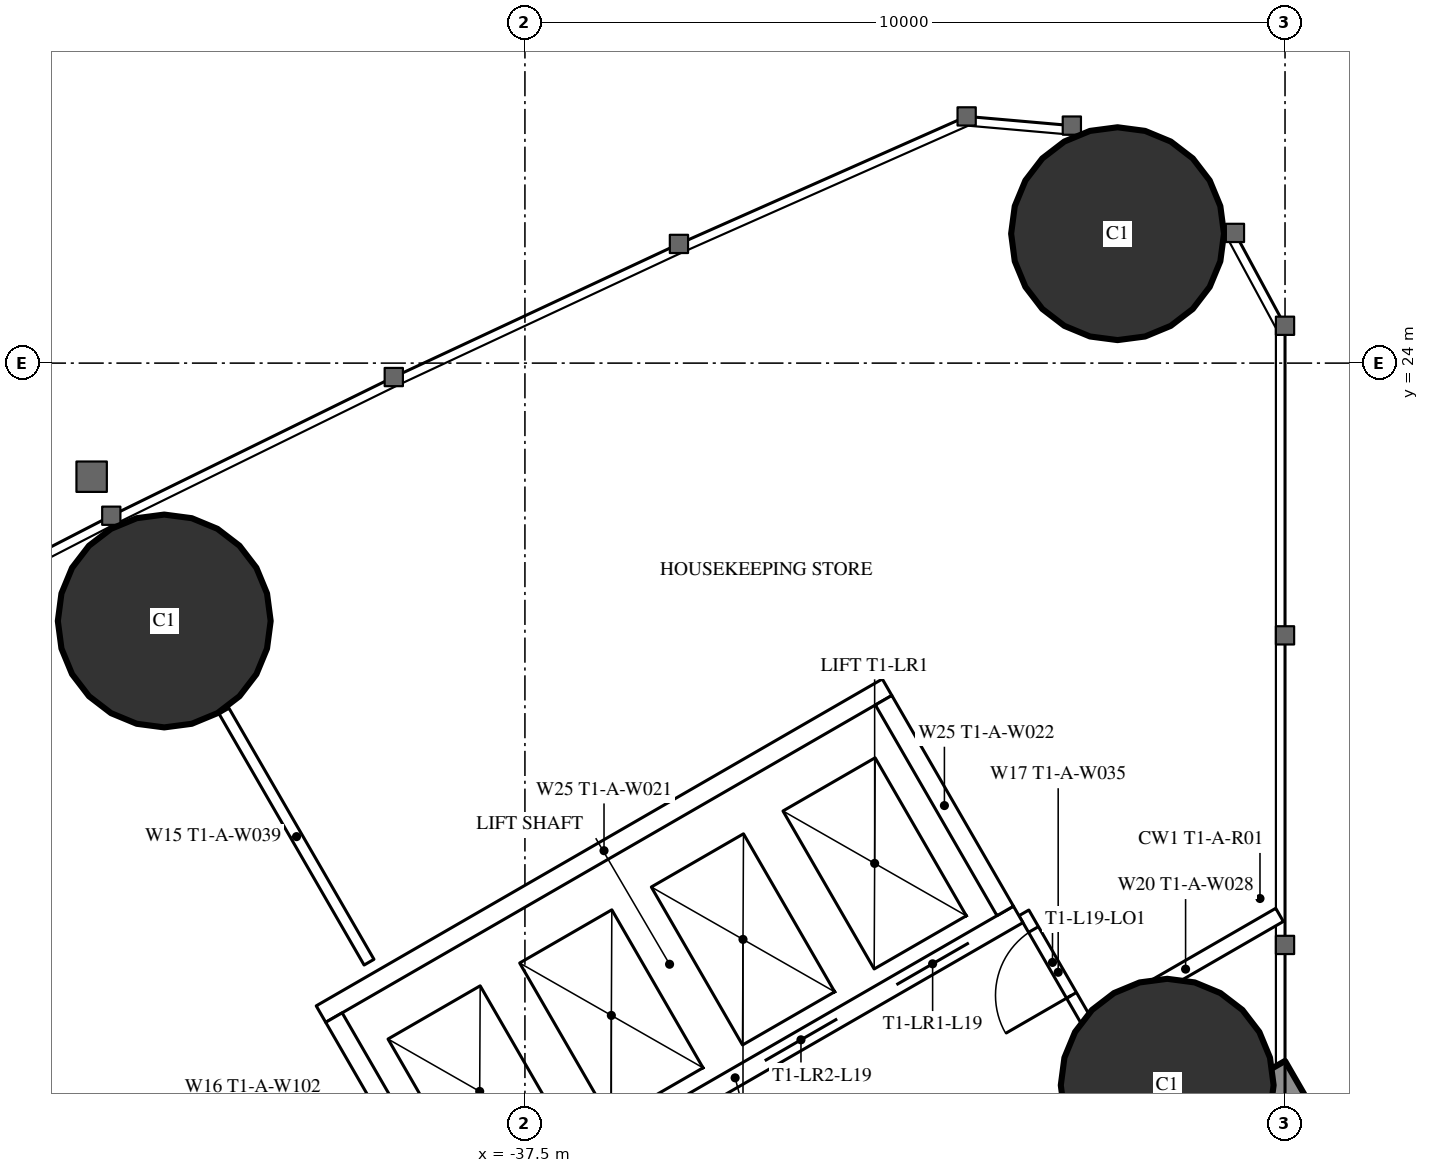
"""IFC4 building model, lengths in metres.
Left out: names, types, materials, properties, quantities, classifications, styles, units other than length and angle.
Written with IfcOpenShell. Run it as: python <this file> out.ifc"""

import sys

from ifc_helpers import new_model, si_unit, direction, frame, frame_2d, origin, origin_2d, place, context, subcontext, project, spatial, rectangle, hollow_circle, extrude, element, fill, save


model = new_model("IFC4")
c1 = context("Model", 3, precision=1e-05, world=origin(), true_north=direction((0.0, 1.0)))
c2 = subcontext(c1, "Body", "Model", "MODEL_VIEW")
j1 = project(units=[si_unit("LENGTHUNIT", "METRE"), si_unit("PLANEANGLEUNIT", "RADIAN")], contexts=[c1])
p1 = place(None, origin())
s1 = spatial("IfcSite", under=j1, at=p1, CompositionType="ELEMENT")
p2 = place(p1, origin())
s2 = spatial("IfcBuilding", under=s1, at=p2, CompositionType="ELEMENT")
p3 = place(p2, frame((0.0, 0.0, 74.0)))
s3 = spatial("IfcBuildingStorey", under=s2, at=p3, CompositionType="ELEMENT", Elevation=74.0)
for number, where, z_axis, x_axis in (
    (1, (-29.703, 25.703, 0.0), (0.0, 0.0, 1.0), (1.0, 0.0, 0.0)),
    (2, (-29.05, 14.5, 0.0), (0.0, 0.0, 1.0), (1.0, 0.0, 0.0)),
    (3, (-42.245, 20.607, 0.0), (0.0, 0.0, 1.0), (1.0, 0.0, 0.0)),
):
    element("IfcColumn", number, at=place(p3, frame(where, z_axis=z_axis, x_axis=x_axis)), inside=s3, PredefinedType="COLUMN", context=c2, shape_type="SweptSolid", body=[
        extrude(hollow_circle(Radius=1.4, WallThickness=0.12, at=origin_2d()), origin(), (0.0, 0.0, 1.0), 3.5),
    ])
p4 = place(p3, frame((-27.2, 14.3, 0.0), z_axis=(0.0, 0.0, 1.0), x_axis=(-0.866026593062, -0.499997940104, 0.0)))
e4 = element("IfcWall", 4, at=p4, inside=s3, PredefinedType="SHEAR", context=c2, shape_type="SweptSolid", body=[
    extrude(rectangle(XDim=28.946, YDim=1.2, at=frame_2d((14.473, 0.0))), origin(), (0.0, 0.0, 1.0), 3.5),
])
p5 = place(p4, frame((4.6, 0.0, 0.0)))
e5 = element("IfcOpeningElement", 5, at=p5, cuts=e4, PredefinedType="OPENING", context=c2, shape_type="SweptSolid", body=[
    extrude(rectangle(XDim=1.0, YDim=2.2, at=frame_2d((0.5, 1.1))), frame((0.0, 0.61, 0.0), z_axis=(0.0, -1.0, 0.0), x_axis=(1.0, 0.0, 0.0)), (0.0, 0.0, 1.0), 1.22),
])
p6 = place(p4, frame((13.395, 0.0, 0.0)))
e6 = element("IfcOpeningElement", 6, at=p6, cuts=e4, PredefinedType="OPENING", context=c2, shape_type="SweptSolid", body=[
    extrude(rectangle(XDim=1.8, YDim=2.2, at=frame_2d((0.9, 1.1))), frame((0.0, 0.61, 0.0), z_axis=(0.0, -1.0, 0.0), x_axis=(1.0, 0.0, 0.0)), (0.0, 0.0, 1.0), 1.22),
])
p7 = place(p3, frame((-39.551, 16.119, 0.0), z_axis=(0.0, 0.0, 1.0), x_axis=(-0.500014214979, 0.866017196607, 0.0)))
e7 = element("IfcWall", 7, at=p7, inside=s3, PredefinedType="PARTITIONING", context=c2, shape_type="SweptSolid", body=[
    extrude(rectangle(XDim=3.815, YDim=0.15, at=frame_2d((1.907, 0.0))), origin(), (0.0, 0.0, 1.0), 3.25),
])
p8 = place(p3, frame((-27.572, 16.741, 0.0), z_axis=(0.0, 0.0, 1.0), x_axis=(-0.866034618596, -0.499984039138, 0.0)))
e8 = element("IfcWall", 8, at=p8, inside=s3, PredefinedType="PARTITIONING", context=c2, shape_type="SweptSolid", body=[
    extrude(rectangle(XDim=2.854, YDim=0.2, at=frame_2d((1.427, 0.0))), origin(), (0.0, 0.0, 1.0), 3.25),
])
p9 = place(p3, frame((-30.033, 15.205, 0.0), z_axis=(0.0, 0.0, 1.0), x_axis=(-0.499980071345, 0.866036909293, 0.0)))
e9 = element("IfcWall", 9, at=p9, inside=s3, PredefinedType="PARTITIONING", context=c2, shape_type="SweptSolid", body=[
    extrude(rectangle(XDim=1.805, YDim=0.15, at=frame_2d((0.902, 0.0))), origin(), (0.0, 0.0, 1.0), 3.25),
])
p10 = place(p9, frame((0.552, 0.0, 0.0)))
e10 = element("IfcOpeningElement", 10, at=p10, cuts=e9, PredefinedType="OPENING", context=c2, shape_type="SweptSolid", body=[
    extrude(rectangle(XDim=1.0, YDim=2.2, at=frame_2d((0.5, 1.1))), frame((0.0, 0.085, 0.0), z_axis=(0.0, -1.0, 0.0), x_axis=(1.0, 0.0, 0.0)), (0.0, 0.0, 1.0), 0.17),
])
p11 = place(p3, frame((-31.01, 16.747, 0.0), z_axis=(0.0, 0.0, 1.0), x_axis=(-0.866028165386, -0.499995216735, 0.0)))
e11 = element("IfcWall", 11, at=p11, inside=s3, PredefinedType="PARTITIONING", context=c2, shape_type="SweptSolid", body=[
    extrude(rectangle(XDim=8.6, YDim=0.25, at=frame_2d((4.3, 0.0))), origin(), (0.0, 0.0, 1.0), 3.25),
])
p12 = place(p11, frame((0.75, 0.0, 0.0)))
e12 = element("IfcOpeningElement", 12, at=p12, cuts=e11, PredefinedType="OPENING", context=c2, shape_type="SweptSolid", body=[
    extrude(rectangle(XDim=1.1, YDim=2.2, at=frame_2d((0.55, 1.1))), frame((0.0, 0.135, 0.0), z_axis=(0.0, -1.0, 0.0), x_axis=(1.0, 0.0, 0.0)), (0.0, 0.0, 1.0), 0.27),
])
p13 = place(p11, frame((2.75, 0.0, 0.0)))
e13 = element("IfcOpeningElement", 13, at=p13, cuts=e11, PredefinedType="OPENING", context=c2, shape_type="SweptSolid", body=[
    extrude(rectangle(XDim=1.1, YDim=2.2, at=frame_2d((0.55, 1.1))), frame((0.0, 0.135, 0.0), z_axis=(0.0, -1.0, 0.0), x_axis=(1.0, 0.0, 0.0)), (0.0, 0.0, 1.0), 0.27),
])
p14 = place(p11, frame((4.75, 0.0, 0.0)))
e14 = element("IfcOpeningElement", 14, at=p14, cuts=e11, PredefinedType="OPENING", context=c2, shape_type="SweptSolid", body=[
    extrude(rectangle(XDim=1.1, YDim=2.2, at=frame_2d((0.55, 1.1))), frame((0.0, 0.135, 0.0), z_axis=(0.0, -1.0, 0.0), x_axis=(1.0, 0.0, 0.0)), (0.0, 0.0, 1.0), 0.27),
])
p15 = place(p11, frame((6.75, 0.0, 0.0)))
e15 = element("IfcOpeningElement", 15, at=p15, cuts=e11, PredefinedType="OPENING", context=c2, shape_type="SweptSolid", body=[
    extrude(rectangle(XDim=1.1, YDim=2.2, at=frame_2d((0.55, 1.1))), frame((0.0, 0.135, 0.0), z_axis=(0.0, -1.0, 0.0), x_axis=(1.0, 0.0, 0.0)), (0.0, 0.0, 1.0), 0.27),
])
p16 = place(p3, frame((-32.736, 19.736, 0.0), z_axis=(0.0, 0.0, 1.0), x_axis=(-0.866028165386, -0.499995216735, 0.0)))
e16 = element("IfcWall", 16, at=p16, inside=s3, PredefinedType="PARTITIONING", context=c2, shape_type="SweptSolid", body=[
    extrude(rectangle(XDim=8.6, YDim=0.25, at=frame_2d((4.3, 0.0))), origin(), (0.0, 0.0, 1.0), 3.25),
])
p17 = place(p3, frame((-31.181, 16.793, 0.0), z_axis=(0.0, 0.0, 1.0), x_axis=(-0.499929347863, 0.866066190972, 0.0)))
e17 = element("IfcWall", 17, at=p17, inside=s3, PredefinedType="PARTITIONING", context=c2, shape_type="SweptSolid", body=[
    extrude(rectangle(XDim=3.201, YDim=0.25, at=frame_2d((1.6, 0.0))), origin(), (0.0, 0.0, 1.0), 3.25),
])
p18 = place(p3, frame((-38.413, 12.618, 0.0), z_axis=(0.0, 0.0, 1.0), x_axis=(-0.499872130319, 0.866099216793, 0.0)))
e18 = element("IfcWall", 18, at=p18, inside=s3, PredefinedType="PARTITIONING", context=c2, shape_type="SweptSolid", body=[
    extrude(rectangle(XDim=3.2, YDim=0.25, at=frame_2d((1.6, 0.0))), origin(), (0.0, 0.0, 1.0), 3.25),
])
p19 = place(p10, origin())
e19 = element("IfcDoor", 19, at=p19, inside=s3, OperationType="SINGLE_SWING_LEFT", PredefinedType="DOOR", context=c2, shape_type="SweptSolid", body=[
    extrude(rectangle(XDim=1.0, YDim=2.2, at=frame_2d((0.5, 1.1))), frame((0.0, 0.025, 0.0), z_axis=(0.0, -1.0, 0.0), x_axis=(1.0, 0.0, 0.0)), (0.0, 0.0, 1.0), 0.05),
])
fill(e10, e19)
p20 = place(p12, origin())
e20 = element("IfcDoor", 20, at=p20, inside=s3, OperationType="DOUBLE_DOOR_SLIDING", PredefinedType="USERDEFINED", context=c2, shape_type="SweptSolid", body=[
    extrude(rectangle(XDim=1.1, YDim=2.2, at=frame_2d((0.55, 1.1))), frame((0.0, 0.025, 0.0), z_axis=(0.0, -1.0, 0.0), x_axis=(1.0, 0.0, 0.0)), (0.0, 0.0, 1.0), 0.05),
])
fill(e12, e20)
p21 = place(p13, origin())
e21 = element("IfcDoor", 21, at=p21, inside=s3, OperationType="DOUBLE_DOOR_SLIDING", PredefinedType="USERDEFINED", context=c2, shape_type="SweptSolid", body=[
    extrude(rectangle(XDim=1.1, YDim=2.2, at=frame_2d((0.55, 1.1))), frame((0.0, 0.025, 0.0), z_axis=(0.0, -1.0, 0.0), x_axis=(1.0, 0.0, 0.0)), (0.0, 0.0, 1.0), 0.05),
])
fill(e13, e21)
p22 = place(p14, origin())
e22 = element("IfcDoor", 22, at=p22, inside=s3, OperationType="DOUBLE_DOOR_SLIDING", PredefinedType="USERDEFINED", context=c2, shape_type="SweptSolid", body=[
    extrude(rectangle(XDim=1.1, YDim=2.2, at=frame_2d((0.55, 1.1))), frame((0.0, 0.025, 0.0), z_axis=(0.0, -1.0, 0.0), x_axis=(1.0, 0.0, 0.0)), (0.0, 0.0, 1.0), 0.05),
])
fill(e14, e22)
save(model, sys.argv[1])
